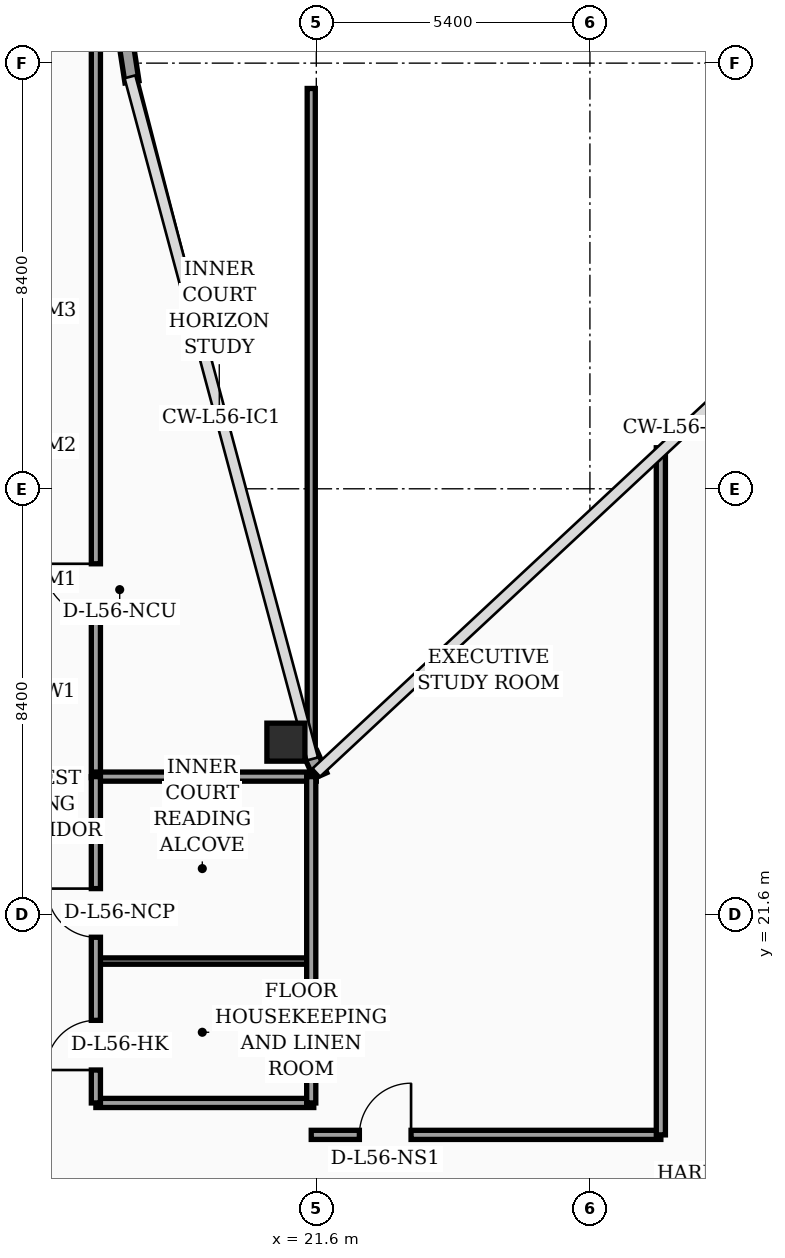
"""IFC4 building model, lengths in metres.
Left out: names, types, materials, properties, quantities, classifications, styles, units other than length and angle.
Written with IfcOpenShell. Run it as: python <this file> out.ifc"""

import sys

from ifc_helpers import new_model, si_unit, direction, frame, frame_2d, origin, origin_2d, place, context, subcontext, project, spatial, rectangle, hollow_rectangle, extrude, element, fill, save


model = new_model("IFC4")
c1 = context("Model", 3, precision=1e-05, world=origin(), true_north=direction((0.0, 1.0)))
c2 = subcontext(c1, "Body", "Model", "MODEL_VIEW")
j1 = project(units=[si_unit("LENGTHUNIT", "METRE"), si_unit("PLANEANGLEUNIT", "RADIAN")], contexts=[c1])
p1 = place(None, origin())
s1 = spatial("IfcSite", under=j1, at=p1, CompositionType="ELEMENT")
p2 = place(p1, origin())
s2 = spatial("IfcBuilding", under=s1, at=p2, CompositionType="ELEMENT")
p3 = place(p2, frame((0.0, 0.0, 226.9)))
s3 = spatial("IfcBuildingStorey", under=s2, at=p3, CompositionType="ELEMENT", Elevation=226.9)
p4 = place(p3, frame((21.0, 25.0, 0.0), z_axis=(0.0, 0.0, 1.0), x_axis=(1.0, 0.0, 0.0)))
e1 = element("IfcColumn", 1, at=p4, inside=s3, PredefinedType="COLUMN", context=c2, shape_type="SweptSolid", body=[
    extrude(hollow_rectangle(XDim=0.75, YDim=0.75, WallThickness=0.032, at=origin_2d()), origin(), (0.0, 0.0, 1.0), 3.56),
])
p5 = place(p3, frame((21.68, 24.34, 0.0), z_axis=(0.0, 0.0, 1.0), x_axis=(-0.40758134973, 0.913168901875, 0.0)))
e2 = element("IfcWall", 2, at=p5, inside=s3, PredefinedType="SOLIDWALL", context=c2, shape_type="SweptSolid", body=[
    extrude(rectangle(XDim=0.471, YDim=0.28, at=frame_2d((0.235, 0.0))), origin(), (0.0, 0.0, 1.0), 3.56),
])
p6 = place(p3, frame((17.962, 38.03, 0.0), z_axis=(0.0, 0.0, 1.0), x_axis=(-0.15141125477, 0.988470855377, 0.0)))
e3 = element("IfcWall", 3, at=p6, inside=s3, PredefinedType="SOLIDWALL", context=c2, shape_type="SweptSolid", body=[
    extrude(rectangle(XDim=0.739, YDim=0.28, at=frame_2d((0.369, 0.0))), origin(), (0.0, 0.0, 1.0), 3.56),
])
p7 = place(p3, frame((17.25, 24.3, 0.0), z_axis=(0.0, 0.0, 1.0), x_axis=(0.0, 1.0, 0.0)))
e4 = element("IfcWall", 4, at=p7, inside=s3, PredefinedType="PARTITIONING", context=c2, shape_type="SweptSolid", body=[
    extrude(rectangle(XDim=18.15, YDim=0.18, at=frame_2d((9.075, 0.0))), origin(), (0.0, 0.0, 1.0), 2.94),
])
p8 = place(p7, frame((3.2, 0.0, 0.0)))
e5 = element("IfcOpeningElement", 5, at=p8, cuts=e4, PredefinedType="OPENING", context=c2, shape_type="SweptSolid", body=[
    extrude(rectangle(XDim=1.02, YDim=2.2, at=frame_2d((0.51, 1.1))), frame((0.0, 0.1, 0.0), z_axis=(0.0, -1.0, 0.0), x_axis=(1.0, 0.0, 0.0)), (0.0, 0.0, 1.0), 0.2),
])
p9 = place(p3, frame((17.25, 17.88, 0.0), z_axis=(0.0, 0.0, 1.0), x_axis=(1.0, 0.0, 0.0)))
e6 = element("IfcWall", 6, at=p9, inside=s3, PredefinedType="PARTITIONING", context=c2, shape_type="SweptSolid", body=[
    extrude(rectangle(XDim=4.3, YDim=0.18, at=frame_2d((2.15, 0.0))), origin(), (0.0, 0.0, 1.0), 3.56),
])
p10 = place(p3, frame((17.25, 20.68, 0.0), z_axis=(0.0, 0.0, 1.0), x_axis=(1.0, 0.0, 0.0)))
e7 = element("IfcWall", 7, at=p10, inside=s3, PredefinedType="PARTITIONING", context=c2, shape_type="SweptSolid", body=[
    extrude(rectangle(XDim=4.3, YDim=0.125, at=frame_2d((2.15, 0.0))), origin(), (0.0, 0.0, 1.0), 3.56),
])
p11 = place(p3, frame((17.25, 24.32, 0.0), z_axis=(0.0, 0.0, 1.0), x_axis=(1.0, 0.0, 0.0)))
e8 = element("IfcWall", 8, at=p11, inside=s3, PredefinedType="PARTITIONING", context=c2, shape_type="SweptSolid", body=[
    extrude(rectangle(XDim=4.35, YDim=0.18, at=frame_2d((2.175, 0.0))), origin(), (0.0, 0.0, 1.0), 3.56),
])
p12 = place(p3, frame((21.5, 17.88, 0.0), z_axis=(0.0, 0.0, 1.0), x_axis=(0.0, 1.0, 0.0)))
e9 = element("IfcWall", 9, at=p12, inside=s3, PredefinedType="PARTITIONING", context=c2, shape_type="SweptSolid", body=[
    extrude(rectangle(XDim=6.44, YDim=0.18, at=frame_2d((3.22, 0.0))), origin(), (0.0, 0.0, 1.0), 3.09),
])
p13 = place(p3, frame((17.25, 17.88, 0.0), z_axis=(0.0, 0.0, 1.0), x_axis=(0.0, 1.0, 0.0)))
e10 = element("IfcWall", 10, at=p13, inside=s3, PredefinedType="PARTITIONING", context=c2, shape_type="SweptSolid", body=[
    extrude(rectangle(XDim=6.44, YDim=0.18, at=frame_2d((3.22, 0.0))), origin(), (0.0, 0.0, 1.0), 3.09),
])
p14 = place(p13, frame((0.65, 0.0, 0.0)))
e11 = element("IfcOpeningElement", 11, at=p14, cuts=e10, PredefinedType="OPENING", context=c2, shape_type="SweptSolid", body=[
    extrude(rectangle(XDim=0.98, YDim=2.15, at=frame_2d((0.49, 1.075))), frame((0.0, 0.1, 0.0), z_axis=(0.0, -1.0, 0.0), x_axis=(1.0, 0.0, 0.0)), (0.0, 0.0, 1.0), 0.2),
])
p15 = place(p13, frame((3.27, 0.0, 0.0)))
e12 = element("IfcOpeningElement", 12, at=p15, cuts=e10, PredefinedType="OPENING", context=c2, shape_type="SweptSolid", body=[
    extrude(rectangle(XDim=0.96, YDim=2.2, at=frame_2d((0.48, 1.1))), frame((0.0, 0.1, 0.0), z_axis=(0.0, -1.0, 0.0), x_axis=(1.0, 0.0, 0.0)), (0.0, 0.0, 1.0), 0.2),
])
p16 = place(p3, frame((21.5, 24.85, 0.0), z_axis=(0.0, 0.0, 1.0), x_axis=(0.0, 1.0, 0.0)))
e13 = element("IfcWall", 13, at=p16, inside=s3, PredefinedType="PARTITIONING", context=c2, shape_type="SweptSolid", body=[
    extrude(rectangle(XDim=13.05, YDim=0.16, at=frame_2d((6.525, 0.0))), origin(), (0.0, 0.0, 1.0), 2.94),
])
p17 = place(p3, frame((21.5, 17.25, 0.0), z_axis=(0.0, 0.0, 1.0), x_axis=(1.0, 0.0, 0.0)))
e14 = element("IfcWall", 14, at=p17, inside=s3, PredefinedType="PARTITIONING", context=c2, shape_type="SweptSolid", body=[
    extrude(rectangle(XDim=6.9, YDim=0.18, at=frame_2d((3.45, 0.0))), origin(), (0.0, 0.0, 1.0), 2.94),
])
p18 = place(p17, frame((0.95, 0.0, 0.0)))
e15 = element("IfcOpeningElement", 15, at=p18, cuts=e14, PredefinedType="OPENING", context=c2, shape_type="SweptSolid", body=[
    extrude(rectangle(XDim=1.02, YDim=2.2, at=frame_2d((0.51, 1.1))), frame((0.0, 0.1, 0.0), z_axis=(0.0, -1.0, 0.0), x_axis=(1.0, 0.0, 0.0)), (0.0, 0.0, 1.0), 0.2),
])
p19 = place(p3, frame((28.4, 17.25, 0.0), z_axis=(0.0, 0.0, 1.0), x_axis=(0.0, 1.0, 0.0)))
e16 = element("IfcWall", 16, at=p19, inside=s3, PredefinedType="PARTITIONING", context=c2, shape_type="SweptSolid", body=[
    extrude(rectangle(XDim=13.56, YDim=0.18, at=frame_2d((6.78, 0.0))), origin(), (0.0, 0.0, 1.0), 2.94),
])
p20 = place(p8, origin())
e17 = element("IfcDoor", 17, at=p20, inside=s3, OperationType="SINGLE_SWING_RIGHT", PredefinedType="DOOR", context=c2, shape_type="SweptSolid", body=[
    extrude(rectangle(XDim=1.02, YDim=2.2, at=frame_2d((0.51, 1.1))), frame((0.0, 0.025, 0.0), z_axis=(0.0, -1.0, 0.0), x_axis=(1.0, 0.0, 0.0)), (0.0, 0.0, 1.0), 0.05),
])
fill(e5, e17)
p21 = place(p14, origin())
e18 = element("IfcDoor", 18, at=p21, inside=s3, OperationType="SINGLE_SWING_LEFT", PredefinedType="DOOR", context=c2, shape_type="SweptSolid", body=[
    extrude(rectangle(XDim=0.98, YDim=2.15, at=frame_2d((0.49, 1.075))), frame((0.0, 0.025, 0.0), z_axis=(0.0, -1.0, 0.0), x_axis=(1.0, 0.0, 0.0)), (0.0, 0.0, 1.0), 0.05),
])
fill(e11, e18)
p22 = place(p15, origin())
e19 = element("IfcDoor", 19, at=p22, inside=s3, OperationType="SINGLE_SWING_RIGHT", PredefinedType="DOOR", context=c2, shape_type="SweptSolid", body=[
    extrude(rectangle(XDim=0.96, YDim=2.2, at=frame_2d((0.48, 1.1))), frame((0.0, 0.025, 0.0), z_axis=(0.0, -1.0, 0.0), x_axis=(1.0, 0.0, 0.0)), (0.0, 0.0, 1.0), 0.05),
])
fill(e12, e19)
p23 = place(p18, origin())
e20 = element("IfcDoor", 20, at=p23, inside=s3, OperationType="SINGLE_SWING_RIGHT", PredefinedType="DOOR", context=c2, shape_type="SweptSolid", body=[
    extrude(rectangle(XDim=1.02, YDim=2.2, at=frame_2d((0.51, 1.1))), frame((0.0, 0.025, 0.0), z_axis=(0.0, -1.0, 0.0), x_axis=(1.0, 0.0, 0.0)), (0.0, 0.0, 1.0), 0.05),
])
fill(e15, e20)
save(model, sys.argv[1])
